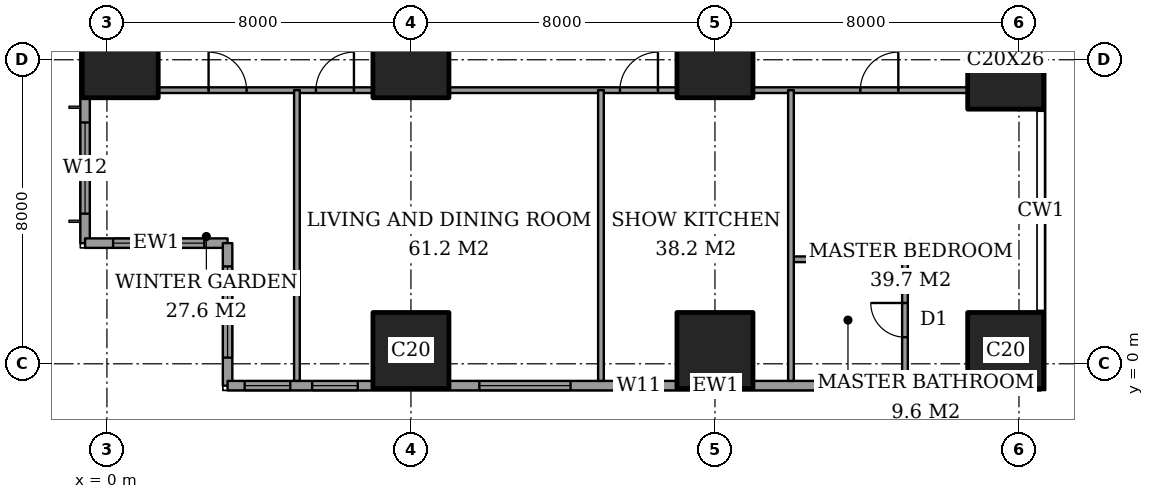
"""IFC4 building model, lengths in metres.
Left out: names, types, materials, properties, quantities, classifications, styles, units other than length and angle.
Written with IfcOpenShell. Run it as: python <this file> out.ifc"""

import sys

from ifc_helpers import new_model, si_unit, direction, frame, frame_2d, origin, origin_2d, place, context, subcontext, project, spatial, rectangle, extrude, element, fill, save


model = new_model("IFC4")
c1 = context("Model", 3, precision=1e-05, world=origin(), true_north=direction((0.0, 1.0)))
c2 = subcontext(c1, "Body", "Model", "MODEL_VIEW")
j1 = project(units=[si_unit("LENGTHUNIT", "METRE"), si_unit("PLANEANGLEUNIT", "RADIAN")], contexts=[c1])
p1 = place(None, origin())
s1 = spatial("IfcSite", under=j1, at=p1, CompositionType="ELEMENT")
p2 = place(p1, origin())
s2 = spatial("IfcBuilding", under=s1, at=p2, CompositionType="ELEMENT")
p3 = place(p2, frame((0.0, 0.0, 168.2)))
s3 = spatial("IfcBuildingStorey", under=s2, at=p3, CompositionType="ELEMENT", Elevation=168.2)
for number, where, z_axis, x_axis in (
    (1, (0.35, 8.0, 0.0), (0.0, 0.0, 1.0), (1.0, 0.0, 0.0)),
    (2, (8.0, 0.35, 0.0), (0.0, 0.0, 1.0), (1.0, 0.0, 0.0)),
    (3, (8.0, 8.0, 0.0), (0.0, 0.0, 1.0), (1.0, 0.0, 0.0)),
    (4, (16.0, 0.35, 0.0), (0.0, 0.0, 1.0), (1.0, 0.0, 0.0)),
    (5, (16.0, 8.0, 0.0), (0.0, 0.0, 1.0), (1.0, 0.0, 0.0)),
    (6, (23.65, 0.35, 0.0), (0.0, 0.0, 1.0), (1.0, 0.0, 0.0)),
):
    element("IfcColumn", number, at=place(p3, frame(where, z_axis=z_axis, x_axis=x_axis)), inside=s3, PredefinedType="COLUMN", context=c2, shape_type="SweptSolid", body=[
        extrude(rectangle(XDim=2.0, YDim=2.0, at=origin_2d()), origin(), (0.0, 0.0, 1.0), 3.6),
    ])
p4 = place(p3, frame((23.65, 8.0, 0.0), z_axis=(0.0, 0.0, 1.0), x_axis=(1.0, 0.0, 0.0)))
e7 = element("IfcColumn", 7, at=p4, inside=s3, PredefinedType="COLUMN", context=c2, shape_type="SweptSolid", body=[
    extrude(rectangle(XDim=2.0, YDim=2.6, at=origin_2d()), origin(), (0.0, 0.0, 1.0), 3.6),
])
p5 = place(p3, frame((-0.575, 44.825, 0.0), z_axis=(0.0, 0.0, 1.0), x_axis=(0.0, -1.0, 0.0)))
e8 = element("IfcWall", 8, at=p5, inside=s3, PredefinedType="SOLIDWALL", context=c2, shape_type="SweptSolid", body=[
    extrude(rectangle(XDim=41.65, YDim=0.25, at=frame_2d((20.825, 0.0))), origin(), (0.0, 0.0, 1.0), 3.6),
])
p6 = place(p5, frame((0.775, 0.0, 0.4)))
e9 = element("IfcOpeningElement", 9, at=p6, cuts=e8, PredefinedType="OPENING", context=c2, shape_type="SweptSolid", body=[
    extrude(rectangle(XDim=2.4, YDim=2.2, at=frame_2d((1.2, 1.1))), frame((0.0, 0.135, 0.0), z_axis=(0.0, -1.0, 0.0), x_axis=(1.0, 0.0, 0.0)), (0.0, 0.0, 1.0), 0.27),
])
p7 = place(p5, frame((6.1, 0.0, 0.4)))
e10 = element("IfcOpeningElement", 10, at=p7, cuts=e8, PredefinedType="OPENING", context=c2, shape_type="SweptSolid", body=[
    extrude(rectangle(XDim=1.2, YDim=2.2, at=frame_2d((0.6, 1.1))), frame((0.0, 0.135, 0.0), z_axis=(0.0, -1.0, 0.0), x_axis=(1.0, 0.0, 0.0)), (0.0, 0.0, 1.0), 0.27),
])
p8 = place(p5, frame((8.425, 0.0, 0.4)))
e11 = element("IfcOpeningElement", 11, at=p8, cuts=e8, PredefinedType="OPENING", context=c2, shape_type="SweptSolid", body=[
    extrude(rectangle(XDim=2.4, YDim=2.2, at=frame_2d((1.2, 1.1))), frame((0.0, 0.135, 0.0), z_axis=(0.0, -1.0, 0.0), x_axis=(1.0, 0.0, 0.0)), (0.0, 0.0, 1.0), 0.27),
])
p9 = place(p5, frame((15.625, 0.0, 0.4)))
e12 = element("IfcOpeningElement", 12, at=p9, cuts=e8, PredefinedType="OPENING", context=c2, shape_type="SweptSolid", body=[
    extrude(rectangle(XDim=2.4, YDim=2.2, at=frame_2d((1.2, 1.1))), frame((0.0, 0.135, 0.0), z_axis=(0.0, -1.0, 0.0), x_axis=(1.0, 0.0, 0.0)), (0.0, 0.0, 1.0), 0.27),
])
p10 = place(p5, frame((23.625, 0.0, 0.4)))
e13 = element("IfcOpeningElement", 13, at=p10, cuts=e8, PredefinedType="OPENING", context=c2, shape_type="SweptSolid", body=[
    extrude(rectangle(XDim=2.4, YDim=2.2, at=frame_2d((1.2, 1.1))), frame((0.0, 0.135, 0.0), z_axis=(0.0, -1.0, 0.0), x_axis=(1.0, 0.0, 0.0)), (0.0, 0.0, 1.0), 0.27),
])
p11 = place(p5, frame((30.825, 0.0, 0.4)))
e14 = element("IfcOpeningElement", 14, at=p11, cuts=e8, PredefinedType="OPENING", context=c2, shape_type="SweptSolid", body=[
    extrude(rectangle(XDim=2.4, YDim=2.2, at=frame_2d((1.2, 1.1))), frame((0.0, 0.135, 0.0), z_axis=(0.0, -1.0, 0.0), x_axis=(1.0, 0.0, 0.0)), (0.0, 0.0, 1.0), 0.27),
])
p12 = place(p5, frame((34.5, 0.0, 0.4)))
e15 = element("IfcOpeningElement", 15, at=p12, cuts=e8, PredefinedType="OPENING", context=c2, shape_type="SweptSolid", body=[
    extrude(rectangle(XDim=1.2, YDim=2.2, at=frame_2d((0.6, 1.1))), frame((0.0, 0.135, 0.0), z_axis=(0.0, -1.0, 0.0), x_axis=(1.0, 0.0, 0.0)), (0.0, 0.0, 1.0), 0.27),
])
p13 = place(p5, frame((38.475, 0.0, 0.4)))
e16 = element("IfcOpeningElement", 16, at=p13, cuts=e8, PredefinedType="OPENING", context=c2, shape_type="SweptSolid", body=[
    extrude(rectangle(XDim=2.4, YDim=2.2, at=frame_2d((1.2, 1.1))), frame((0.0, 0.135, 0.0), z_axis=(0.0, -1.0, 0.0), x_axis=(1.0, 0.0, 0.0)), (0.0, 0.0, 1.0), 0.27),
])
p14 = place(p3, frame((-0.575, 3.175, 0.0), z_axis=(0.0, 0.0, 1.0), x_axis=(1.0, 0.0, 0.0)))
e17 = element("IfcWall", 17, at=p14, inside=s3, PredefinedType="SOLIDWALL", context=c2, shape_type="SweptSolid", body=[
    extrude(rectangle(XDim=3.75, YDim=0.25, at=frame_2d((1.875, 0.0))), origin(), (0.0, 0.0, 1.0), 3.6),
])
p15 = place(p14, frame((0.738, 0.0, 0.4)))
e18 = element("IfcOpeningElement", 18, at=p15, cuts=e17, PredefinedType="OPENING", context=c2, shape_type="SweptSolid", body=[
    extrude(rectangle(XDim=2.4, YDim=2.2, at=frame_2d((1.2, 1.1))), frame((0.0, 0.135, 0.0), z_axis=(0.0, -1.0, 0.0), x_axis=(1.0, 0.0, 0.0)), (0.0, 0.0, 1.0), 0.27),
])
p16 = place(p3, frame((3.175, 3.175, 0.0), z_axis=(0.0, 0.0, 1.0), x_axis=(0.0, -1.0, 0.0)))
e19 = element("IfcWall", 19, at=p16, inside=s3, PredefinedType="SOLIDWALL", context=c2, shape_type="SweptSolid", body=[
    extrude(rectangle(XDim=3.75, YDim=0.25, at=frame_2d((1.875, 0.0))), origin(), (0.0, 0.0, 1.0), 3.6),
])
p17 = place(p16, frame((0.613, 0.0, 0.4)))
e20 = element("IfcOpeningElement", 20, at=p17, cuts=e19, PredefinedType="OPENING", context=c2, shape_type="SweptSolid", body=[
    extrude(rectangle(XDim=2.4, YDim=2.2, at=frame_2d((1.2, 1.1))), frame((0.0, 0.135, 0.0), z_axis=(0.0, -1.0, 0.0), x_axis=(1.0, 0.0, 0.0)), (0.0, 0.0, 1.0), 0.27),
])
p18 = place(p3, frame((3.175, -0.575, 0.0), z_axis=(0.0, 0.0, 1.0), x_axis=(1.0, 0.0, 0.0)))
e21 = element("IfcWall", 21, at=p18, inside=s3, PredefinedType="SOLIDWALL", context=c2, shape_type="SweptSolid", body=[
    extrude(rectangle(XDim=21.4, YDim=0.25, at=frame_2d((10.7, 0.0))), origin(), (0.0, 0.0, 1.0), 3.6),
])
p19 = place(p18, frame((0.45, 0.0, 0.4)))
e22 = element("IfcOpeningElement", 22, at=p19, cuts=e21, PredefinedType="OPENING", context=c2, shape_type="SweptSolid", body=[
    extrude(rectangle(XDim=1.2, YDim=2.2, at=frame_2d((0.6, 1.1))), frame((0.0, 0.135, 0.0), z_axis=(0.0, -1.0, 0.0), x_axis=(1.0, 0.0, 0.0)), (0.0, 0.0, 1.0), 0.27),
])
p20 = place(p18, frame((2.225, 0.0, 0.4)))
e23 = element("IfcOpeningElement", 23, at=p20, cuts=e21, PredefinedType="OPENING", context=c2, shape_type="SweptSolid", body=[
    extrude(rectangle(XDim=1.2, YDim=2.2, at=frame_2d((0.6, 1.1))), frame((0.0, 0.135, 0.0), z_axis=(0.0, -1.0, 0.0), x_axis=(1.0, 0.0, 0.0)), (0.0, 0.0, 1.0), 0.27),
])
p21 = place(p18, frame((6.625, 0.0, 0.4)))
e24 = element("IfcOpeningElement", 24, at=p21, cuts=e21, PredefinedType="OPENING", context=c2, shape_type="SweptSolid", body=[
    extrude(rectangle(XDim=2.4, YDim=2.2, at=frame_2d((1.2, 1.1))), frame((0.0, 0.135, 0.0), z_axis=(0.0, -1.0, 0.0), x_axis=(1.0, 0.0, 0.0)), (0.0, 0.0, 1.0), 0.27),
])
p22 = place(p18, frame((10.225, 0.0, 0.4)))
e25 = element("IfcOpeningElement", 25, at=p22, cuts=e21, PredefinedType="OPENING", context=c2, shape_type="SweptSolid", body=[
    extrude(rectangle(XDim=1.2, YDim=2.2, at=frame_2d((0.6, 1.1))), frame((0.0, 0.135, 0.0), z_axis=(0.0, -1.0, 0.0), x_axis=(1.0, 0.0, 0.0)), (0.0, 0.0, 1.0), 0.27),
])
p23 = place(p18, frame((15.725, 0.0, 0.4)))
e26 = element("IfcOpeningElement", 26, at=p23, cuts=e21, PredefinedType="OPENING", context=c2, shape_type="SweptSolid", body=[
    extrude(rectangle(XDim=1.2, YDim=2.2, at=frame_2d((0.6, 1.1))), frame((0.0, 0.135, 0.0), z_axis=(0.0, -1.0, 0.0), x_axis=(1.0, 0.0, 0.0)), (0.0, 0.0, 1.0), 0.27),
])
p24 = place(p18, frame((18.125, 0.0, 0.4)))
e27 = element("IfcOpeningElement", 27, at=p24, cuts=e21, PredefinedType="OPENING", context=c2, shape_type="SweptSolid", body=[
    extrude(rectangle(XDim=1.2, YDim=2.2, at=frame_2d((0.6, 1.1))), frame((0.0, 0.135, 0.0), z_axis=(0.0, -1.0, 0.0), x_axis=(1.0, 0.0, 0.0)), (0.0, 0.0, 1.0), 0.27),
])
p25 = place(p3, frame((18.0, 2.75, 0.0), z_axis=(0.0, 0.0, 1.0), x_axis=(1.0, 0.0, 0.0)))
e28 = element("IfcWall", 28, at=p25, inside=s3, PredefinedType="PARTITIONING", context=c2, shape_type="SweptSolid", body=[
    extrude(rectangle(XDim=3.0, YDim=0.15, at=frame_2d((1.5, 0.0))), origin(), (0.0, 0.0, 1.0), 3.25),
])
p26 = place(p3, frame((1.35, 7.2, 0.0), z_axis=(0.0, 0.0, 1.0), x_axis=(1.0, 0.0, 0.0)))
e29 = element("IfcWall", 29, at=p26, inside=s3, PredefinedType="PARTITIONING", context=c2, shape_type="SweptSolid", body=[
    extrude(rectangle(XDim=5.65, YDim=0.15, at=frame_2d((2.825, 0.0))), origin(), (0.0, 0.0, 1.0), 3.25),
])
p27 = place(p26, frame((1.325, 0.0, 0.0)))
e30 = element("IfcOpeningElement", 30, at=p27, cuts=e29, PredefinedType="OPENING", context=c2, shape_type="SweptSolid", body=[
    extrude(rectangle(XDim=1.0, YDim=2.1, at=frame_2d((0.5, 1.05))), frame((0.0, 0.085, 0.0), z_axis=(0.0, -1.0, 0.0), x_axis=(1.0, 0.0, 0.0)), (0.0, 0.0, 1.0), 0.17),
])
p28 = place(p26, frame((4.15, 0.0, 0.0)))
e31 = element("IfcOpeningElement", 31, at=p28, cuts=e29, PredefinedType="OPENING", context=c2, shape_type="SweptSolid", body=[
    extrude(rectangle(XDim=1.0, YDim=2.1, at=frame_2d((0.5, 1.05))), frame((0.0, 0.085, 0.0), z_axis=(0.0, -1.0, 0.0), x_axis=(1.0, 0.0, 0.0)), (0.0, 0.0, 1.0), 0.17),
])
p29 = place(p3, frame((9.0, 7.2, 0.0), z_axis=(0.0, 0.0, 1.0), x_axis=(1.0, 0.0, 0.0)))
e32 = element("IfcWall", 32, at=p29, inside=s3, PredefinedType="PARTITIONING", context=c2, shape_type="SweptSolid", body=[
    extrude(rectangle(XDim=6.0, YDim=0.15, at=frame_2d((3.0, 0.0))), origin(), (0.0, 0.0, 1.0), 3.25),
])
p30 = place(p29, frame((4.5, 0.0, 0.0)))
e33 = element("IfcOpeningElement", 33, at=p30, cuts=e32, PredefinedType="OPENING", context=c2, shape_type="SweptSolid", body=[
    extrude(rectangle(XDim=1.0, YDim=2.1, at=frame_2d((0.5, 1.05))), frame((0.0, 0.085, 0.0), z_axis=(0.0, -1.0, 0.0), x_axis=(1.0, 0.0, 0.0)), (0.0, 0.0, 1.0), 0.17),
])
p31 = place(p3, frame((17.0, 7.2, 0.0), z_axis=(0.0, 0.0, 1.0), x_axis=(1.0, 0.0, 0.0)))
e34 = element("IfcWall", 34, at=p31, inside=s3, PredefinedType="PARTITIONING", context=c2, shape_type="SweptSolid", body=[
    extrude(rectangle(XDim=5.65, YDim=0.15, at=frame_2d((2.825, 0.0))), origin(), (0.0, 0.0, 1.0), 3.25),
])
p32 = place(p31, frame((2.825, 0.0, 0.0)))
e35 = element("IfcOpeningElement", 35, at=p32, cuts=e34, PredefinedType="OPENING", context=c2, shape_type="SweptSolid", body=[
    extrude(rectangle(XDim=1.0, YDim=2.1, at=frame_2d((0.5, 1.05))), frame((0.0, 0.085, 0.0), z_axis=(0.0, -1.0, 0.0), x_axis=(1.0, 0.0, 0.0)), (0.0, 0.0, 1.0), 0.17),
])
for number, where, z_axis, x_axis in (
    (36, (5.0, -0.45, 0.0), (0.0, 0.0, 1.0), (0.0, 1.0, 0.0)),
    (37, (13.0, -0.45, 0.0), (0.0, 0.0, 1.0), (0.0, 1.0, 0.0)),
    (38, (18.0, -0.45, 0.0), (0.0, 0.0, 1.0), (0.0, 1.0, 0.0)),
):
    element("IfcWall", number, at=place(p3, frame(where, z_axis=z_axis, x_axis=x_axis)), inside=s3, PredefinedType="PARTITIONING", context=c2, shape_type="SweptSolid", body=[
        extrude(rectangle(XDim=7.65, YDim=0.15, at=frame_2d((3.825, 0.0))), origin(), (0.0, 0.0, 1.0), 3.25),
    ])
p33 = place(p3, frame((21.0, -0.45, 0.0), z_axis=(0.0, 0.0, 1.0), x_axis=(0.0, 1.0, 0.0)))
e39 = element("IfcWall", 39, at=p33, inside=s3, PredefinedType="PARTITIONING", context=c2, shape_type="SweptSolid", body=[
    extrude(rectangle(XDim=3.2, YDim=0.15, at=frame_2d((1.6, 0.0))), origin(), (0.0, 0.0, 1.0), 3.25),
])
p34 = place(p33, frame((1.15, 0.0, 0.0)))
e40 = element("IfcOpeningElement", 40, at=p34, cuts=e39, PredefinedType="OPENING", context=c2, shape_type="SweptSolid", body=[
    extrude(rectangle(XDim=0.9, YDim=2.1, at=frame_2d((0.45, 1.05))), frame((0.0, 0.085, 0.0), z_axis=(0.0, -1.0, 0.0), x_axis=(1.0, 0.0, 0.0)), (0.0, 0.0, 1.0), 0.17),
])
p35 = place(p13, origin())
e41 = element("IfcWindow", 41, at=p35, inside=s3, PartitioningType="SINGLE_PANEL", PredefinedType="WINDOW", context=c2, shape_type="SweptSolid", body=[
    extrude(rectangle(XDim=2.4, YDim=2.2, at=frame_2d((1.2, 1.1))), frame((0.0, 0.03, 0.0), z_axis=(0.0, -1.0, 0.0), x_axis=(1.0, 0.0, 0.0)), (0.0, 0.0, 1.0), 0.06),
])
fill(e16, e41)
p36 = place(p15, origin())
e42 = element("IfcWindow", 42, at=p36, inside=s3, PartitioningType="SINGLE_PANEL", PredefinedType="WINDOW", context=c2, shape_type="SweptSolid", body=[
    extrude(rectangle(XDim=2.4, YDim=2.2, at=frame_2d((1.2, 1.1))), frame((0.0, 0.03, 0.0), z_axis=(0.0, -1.0, 0.0), x_axis=(1.0, 0.0, 0.0)), (0.0, 0.0, 1.0), 0.06),
])
fill(e18, e42)
p37 = place(p17, origin())
e43 = element("IfcWindow", 43, at=p37, inside=s3, PartitioningType="SINGLE_PANEL", PredefinedType="WINDOW", context=c2, shape_type="SweptSolid", body=[
    extrude(rectangle(XDim=2.4, YDim=2.2, at=frame_2d((1.2, 1.1))), frame((0.0, 0.03, 0.0), z_axis=(0.0, -1.0, 0.0), x_axis=(1.0, 0.0, 0.0)), (0.0, 0.0, 1.0), 0.06),
])
fill(e20, e43)
p38 = place(p19, origin())
e44 = element("IfcWindow", 44, at=p38, inside=s3, PartitioningType="SINGLE_PANEL", PredefinedType="WINDOW", context=c2, shape_type="SweptSolid", body=[
    extrude(rectangle(XDim=1.2, YDim=2.2, at=frame_2d((0.6, 1.1))), frame((0.0, 0.03, 0.0), z_axis=(0.0, -1.0, 0.0), x_axis=(1.0, 0.0, 0.0)), (0.0, 0.0, 1.0), 0.06),
])
fill(e22, e44)
p39 = place(p20, origin())
e45 = element("IfcWindow", 45, at=p39, inside=s3, PartitioningType="SINGLE_PANEL", PredefinedType="WINDOW", context=c2, shape_type="SweptSolid", body=[
    extrude(rectangle(XDim=1.2, YDim=2.2, at=frame_2d((0.6, 1.1))), frame((0.0, 0.03, 0.0), z_axis=(0.0, -1.0, 0.0), x_axis=(1.0, 0.0, 0.0)), (0.0, 0.0, 1.0), 0.06),
])
fill(e23, e45)
p40 = place(p21, origin())
e46 = element("IfcWindow", 46, at=p40, inside=s3, PartitioningType="SINGLE_PANEL", PredefinedType="WINDOW", context=c2, shape_type="SweptSolid", body=[
    extrude(rectangle(XDim=2.4, YDim=2.2, at=frame_2d((1.2, 1.1))), frame((0.0, 0.03, 0.0), z_axis=(0.0, -1.0, 0.0), x_axis=(1.0, 0.0, 0.0)), (0.0, 0.0, 1.0), 0.06),
])
fill(e24, e46)
p41 = place(p22, origin())
e47 = element("IfcWindow", 47, at=p41, inside=s3, PartitioningType="SINGLE_PANEL", PredefinedType="WINDOW", context=c2, shape_type="SweptSolid", body=[
    extrude(rectangle(XDim=1.2, YDim=2.2, at=frame_2d((0.6, 1.1))), frame((0.0, 0.03, 0.0), z_axis=(0.0, -1.0, 0.0), x_axis=(1.0, 0.0, 0.0)), (0.0, 0.0, 1.0), 0.06),
])
fill(e25, e47)
p42 = place(p23, origin())
e48 = element("IfcWindow", 48, at=p42, inside=s3, PartitioningType="SINGLE_PANEL", PredefinedType="WINDOW", context=c2, shape_type="SweptSolid", body=[
    extrude(rectangle(XDim=1.2, YDim=2.2, at=frame_2d((0.6, 1.1))), frame((0.0, 0.03, 0.0), z_axis=(0.0, -1.0, 0.0), x_axis=(1.0, 0.0, 0.0)), (0.0, 0.0, 1.0), 0.06),
])
fill(e26, e48)
p43 = place(p24, origin())
e49 = element("IfcWindow", 49, at=p43, inside=s3, PartitioningType="SINGLE_PANEL", PredefinedType="WINDOW", context=c2, shape_type="SweptSolid", body=[
    extrude(rectangle(XDim=1.2, YDim=2.2, at=frame_2d((0.6, 1.1))), frame((0.0, 0.03, 0.0), z_axis=(0.0, -1.0, 0.0), x_axis=(1.0, 0.0, 0.0)), (0.0, 0.0, 1.0), 0.06),
])
fill(e27, e49)
p44 = place(p27, origin())
e50 = element("IfcDoor", 50, at=p44, inside=s3, OperationType="SINGLE_SWING_RIGHT", PredefinedType="DOOR", context=c2, shape_type="SweptSolid", body=[
    extrude(rectangle(XDim=1.0, YDim=2.1, at=frame_2d((0.5, 1.05))), frame((0.0, 0.025, 0.0), z_axis=(0.0, -1.0, 0.0), x_axis=(1.0, 0.0, 0.0)), (0.0, 0.0, 1.0), 0.05),
])
fill(e30, e50)
p45 = place(p28, origin())
e51 = element("IfcDoor", 51, at=p45, inside=s3, OperationType="SINGLE_SWING_LEFT", PredefinedType="DOOR", context=c2, shape_type="SweptSolid", body=[
    extrude(rectangle(XDim=1.0, YDim=2.1, at=frame_2d((0.5, 1.05))), frame((0.0, 0.025, 0.0), z_axis=(0.0, -1.0, 0.0), x_axis=(1.0, 0.0, 0.0)), (0.0, 0.0, 1.0), 0.05),
])
fill(e31, e51)
p46 = place(p30, origin())
e52 = element("IfcDoor", 52, at=p46, inside=s3, OperationType="SINGLE_SWING_LEFT", PredefinedType="DOOR", context=c2, shape_type="SweptSolid", body=[
    extrude(rectangle(XDim=1.0, YDim=2.1, at=frame_2d((0.5, 1.05))), frame((0.0, 0.025, 0.0), z_axis=(0.0, -1.0, 0.0), x_axis=(1.0, 0.0, 0.0)), (0.0, 0.0, 1.0), 0.05),
])
fill(e33, e52)
p47 = place(p34, origin())
e53 = element("IfcDoor", 53, at=p47, inside=s3, OperationType="SINGLE_SWING_LEFT", PredefinedType="DOOR", context=c2, shape_type="SweptSolid", body=[
    extrude(rectangle(XDim=0.9, YDim=2.1, at=frame_2d((0.45, 1.05))), frame((0.0, 0.025, 0.0), z_axis=(0.0, -1.0, 0.0), x_axis=(1.0, 0.0, 0.0)), (0.0, 0.0, 1.0), 0.05),
])
fill(e40, e53)
p48 = place(p32, origin())
e54 = element("IfcDoor", 54, at=p48, inside=s3, OperationType="SINGLE_SWING_LEFT", PredefinedType="DOOR", context=c2, shape_type="SweptSolid", body=[
    extrude(rectangle(XDim=1.0, YDim=2.1, at=frame_2d((0.5, 1.05))), frame((0.0, 0.025, 0.0), z_axis=(0.0, -1.0, 0.0), x_axis=(1.0, 0.0, 0.0)), (0.0, 0.0, 1.0), 0.05),
])
fill(e35, e54)
save(model, sys.argv[1])
